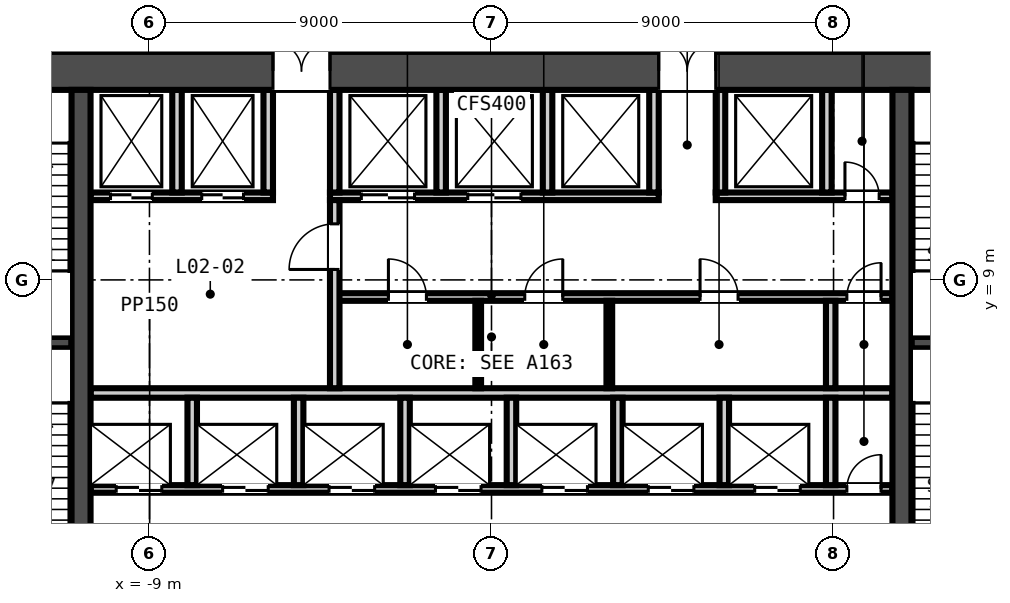
"""IFC4 building model, lengths in metres.
Left out: names, types, materials, properties, quantities, classifications, styles, units other than length and angle.
Written with IfcOpenShell. Run it as: python <this file> out.ifc"""

import sys

from ifc_helpers import new_model, si_unit, direction, frame, frame_2d, origin, place, context, subcontext, project, spatial, rectangle, extrude, element, fill, save


model = new_model("IFC4")
c1 = context("Model", 3, precision=1e-05, world=origin(), true_north=direction((0.0, 1.0)))
c2 = subcontext(c1, "Body", "Model", "MODEL_VIEW")
j1 = project(units=[si_unit("LENGTHUNIT", "METRE"), si_unit("PLANEANGLEUNIT", "RADIAN")], contexts=[c1])
p1 = place(None, origin())
s1 = spatial("IfcSite", under=j1, at=p1, CompositionType="ELEMENT")
p2 = place(p1, origin())
s2 = spatial("IfcBuilding", under=s1, at=p2, CompositionType="ELEMENT")
p3 = place(p2, frame((0.0, 0.0, 18.0)))
s3 = spatial("IfcBuildingStorey", under=s2, at=p3, CompositionType="ELEMENT", Elevation=18.0)
p4 = place(p3, frame((-15.0, 14.5, -0.4), z_axis=(0.0, 0.0, 1.0), x_axis=(1.0, 0.0, 0.0)))
e1 = element("IfcWall", 1, at=p4, inside=s3, PredefinedType="SOLIDWALL", context=c2, shape_type="SweptSolid", body=[
    extrude(rectangle(XDim=30.0, YDim=1.0, at=frame_2d((15.0, 0.0))), origin(), (0.0, 0.0, 1.0), 4.6),
])
p5 = place(p4, frame((9.25, 0.0, 0.4)))
e2 = element("IfcOpeningElement", 2, at=p5, cuts=e1, PredefinedType="OPENING", context=c2, shape_type="SweptSolid", body=[
    extrude(rectangle(XDim=1.5, YDim=2.1, at=frame_2d((0.75, 1.05))), frame((0.0, 0.51, 0.0), z_axis=(0.0, -1.0, 0.0), x_axis=(1.0, 0.0, 0.0)), (0.0, 0.0, 1.0), 1.02),
])
p6 = place(p4, frame((19.4, 0.0, 0.4)))
e3 = element("IfcOpeningElement", 3, at=p6, cuts=e1, PredefinedType="OPENING", context=c2, shape_type="SweptSolid", body=[
    extrude(rectangle(XDim=1.5, YDim=2.1, at=frame_2d((0.75, 1.05))), frame((0.0, 0.51, 0.0), z_axis=(0.0, -1.0, 0.0), x_axis=(1.0, 0.0, 0.0)), (0.0, 0.0, 1.0), 1.02),
])
p7 = place(p4, frame((1.5, 0.0, 0.4)))
e4 = element("IfcOpeningElement", 4, at=p7, cuts=e1, PredefinedType="OPENING", context=c2, shape_type="SweptSolid", body=[
    extrude(rectangle(XDim=1.2, YDim=2.1, at=frame_2d((0.6, 1.05))), frame((0.0, 0.51, 0.0), z_axis=(0.0, -1.0, 0.0), x_axis=(1.0, 0.0, 0.0)), (0.0, 0.0, 1.0), 1.02),
])
p8 = place(p4, frame((27.3, 0.0, 0.4)))
e5 = element("IfcOpeningElement", 5, at=p8, cuts=e1, PredefinedType="OPENING", context=c2, shape_type="SweptSolid", body=[
    extrude(rectangle(XDim=1.2, YDim=2.1, at=frame_2d((0.6, 1.05))), frame((0.0, 0.51, 0.0), z_axis=(0.0, -1.0, 0.0), x_axis=(1.0, 0.0, 0.0)), (0.0, 0.0, 1.0), 1.02),
])
for number, where, z_axis, x_axis in (
    (6, (-10.8, 1.0, -0.4), (0.0, 0.0, 1.0), (0.0, 1.0, 0.0)),
    (7, (10.8, 1.0, -0.4), (0.0, 0.0, 1.0), (0.0, 1.0, 0.0)),
):
    element("IfcWall", number, at=place(p3, frame(where, z_axis=z_axis, x_axis=x_axis)), inside=s3, PredefinedType="SOLIDWALL", context=c2, shape_type="SweptSolid", body=[
        extrude(rectangle(XDim=13.0, YDim=0.5, at=frame_2d((6.5, 0.0))), origin(), (0.0, 0.0, 1.0), 4.6),
    ])
p9 = place(p3, frame((-10.55, 3.5, 0.0), z_axis=(0.0, 0.0, 1.0), x_axis=(1.0, 0.0, 0.0)))
e8 = element("IfcWall", 8, at=p9, inside=s3, PredefinedType="PARTITIONING", context=c2, shape_type="SweptSolid", body=[
    extrude(rectangle(XDim=21.1, YDim=0.2, at=frame_2d((10.55, 0.0))), origin(), (0.0, 0.0, 1.0), 4.2),
])
p10 = place(p9, frame((0.675, 0.0, 0.0)))
e9 = element("IfcOpeningElement", 9, at=p10, cuts=e8, PredefinedType="OPENING", context=c2, shape_type="SweptSolid", body=[
    extrude(rectangle(XDim=1.2, YDim=2.1, at=frame_2d((0.6, 1.05))), frame((0.0, 0.11, 0.0), z_axis=(0.0, -1.0, 0.0), x_axis=(1.0, 0.0, 0.0)), (0.0, 0.0, 1.0), 0.22),
])
p11 = place(p9, frame((3.475, 0.0, 0.0)))
e10 = element("IfcOpeningElement", 10, at=p11, cuts=e8, PredefinedType="OPENING", context=c2, shape_type="SweptSolid", body=[
    extrude(rectangle(XDim=1.2, YDim=2.1, at=frame_2d((0.6, 1.05))), frame((0.0, 0.11, 0.0), z_axis=(0.0, -1.0, 0.0), x_axis=(1.0, 0.0, 0.0)), (0.0, 0.0, 1.0), 0.22),
])
p12 = place(p9, frame((6.275, 0.0, 0.0)))
e11 = element("IfcOpeningElement", 11, at=p12, cuts=e8, PredefinedType="OPENING", context=c2, shape_type="SweptSolid", body=[
    extrude(rectangle(XDim=1.2, YDim=2.1, at=frame_2d((0.6, 1.05))), frame((0.0, 0.11, 0.0), z_axis=(0.0, -1.0, 0.0), x_axis=(1.0, 0.0, 0.0)), (0.0, 0.0, 1.0), 0.22),
])
p13 = place(p9, frame((9.075, 0.0, 0.0)))
e12 = element("IfcOpeningElement", 12, at=p13, cuts=e8, PredefinedType="OPENING", context=c2, shape_type="SweptSolid", body=[
    extrude(rectangle(XDim=1.2, YDim=2.1, at=frame_2d((0.6, 1.05))), frame((0.0, 0.11, 0.0), z_axis=(0.0, -1.0, 0.0), x_axis=(1.0, 0.0, 0.0)), (0.0, 0.0, 1.0), 0.22),
])
p14 = place(p9, frame((11.875, 0.0, 0.0)))
e13 = element("IfcOpeningElement", 13, at=p14, cuts=e8, PredefinedType="OPENING", context=c2, shape_type="SweptSolid", body=[
    extrude(rectangle(XDim=1.2, YDim=2.1, at=frame_2d((0.6, 1.05))), frame((0.0, 0.11, 0.0), z_axis=(0.0, -1.0, 0.0), x_axis=(1.0, 0.0, 0.0)), (0.0, 0.0, 1.0), 0.22),
])
p15 = place(p9, frame((14.675, 0.0, 0.0)))
e14 = element("IfcOpeningElement", 14, at=p15, cuts=e8, PredefinedType="OPENING", context=c2, shape_type="SweptSolid", body=[
    extrude(rectangle(XDim=1.2, YDim=2.1, at=frame_2d((0.6, 1.05))), frame((0.0, 0.11, 0.0), z_axis=(0.0, -1.0, 0.0), x_axis=(1.0, 0.0, 0.0)), (0.0, 0.0, 1.0), 0.22),
])
p16 = place(p9, frame((17.475, 0.0, 0.0)))
e15 = element("IfcOpeningElement", 15, at=p16, cuts=e8, PredefinedType="OPENING", context=c2, shape_type="SweptSolid", body=[
    extrude(rectangle(XDim=1.2, YDim=2.1, at=frame_2d((0.6, 1.05))), frame((0.0, 0.11, 0.0), z_axis=(0.0, -1.0, 0.0), x_axis=(1.0, 0.0, 0.0)), (0.0, 0.0, 1.0), 0.22),
])
p17 = place(p9, frame((19.9, 0.0, 0.0)))
e16 = element("IfcOpeningElement", 16, at=p17, cuts=e8, PredefinedType="OPENING", context=c2, shape_type="SweptSolid", body=[
    extrude(rectangle(XDim=0.9, YDim=2.1, at=frame_2d((0.45, 1.05))), frame((0.0, 0.11, 0.0), z_axis=(0.0, -1.0, 0.0), x_axis=(1.0, 0.0, 0.0)), (0.0, 0.0, 1.0), 0.22),
])
p18 = place(p3, frame((-10.55, 6.025, 0.0), z_axis=(0.0, 0.0, 1.0), x_axis=(1.0, 0.0, 0.0)))
e17 = element("IfcWall", 17, at=p18, inside=s3, PredefinedType="PARTITIONING", context=c2, shape_type="SweptSolid", body=[
    extrude(rectangle(XDim=21.1, YDim=0.25, at=frame_2d((10.55, 0.0))), origin(), (0.0, 0.0, 1.0), 4.2),
])
p19 = place(p3, frame((-4.125, 8.55, 0.0), z_axis=(0.0, 0.0, 1.0), x_axis=(1.0, 0.0, 0.0)))
e18 = element("IfcWall", 18, at=p19, inside=s3, PredefinedType="PARTITIONING", context=c2, shape_type="SweptSolid", body=[
    extrude(rectangle(XDim=14.675, YDim=0.2, at=frame_2d((7.337, 0.0))), origin(), (0.0, 0.0, 1.0), 4.2),
])
p20 = place(p19, frame((1.413, 0.0, 0.0)))
e19 = element("IfcOpeningElement", 19, at=p20, cuts=e18, PredefinedType="OPENING", context=c2, shape_type="SweptSolid", body=[
    extrude(rectangle(XDim=1.0, YDim=2.1, at=frame_2d((0.5, 1.05))), frame((0.0, 0.11, 0.0), z_axis=(0.0, -1.0, 0.0), x_axis=(1.0, 0.0, 0.0)), (0.0, 0.0, 1.0), 0.22),
])
p21 = place(p19, frame((5.0, 0.0, 0.0)))
e20 = element("IfcOpeningElement", 20, at=p21, cuts=e18, PredefinedType="OPENING", context=c2, shape_type="SweptSolid", body=[
    extrude(rectangle(XDim=1.0, YDim=2.1, at=frame_2d((0.5, 1.05))), frame((0.0, 0.11, 0.0), z_axis=(0.0, -1.0, 0.0), x_axis=(1.0, 0.0, 0.0)), (0.0, 0.0, 1.0), 0.22),
])
p22 = place(p19, frame((9.613, 0.0, 0.0)))
e21 = element("IfcOpeningElement", 21, at=p22, cuts=e18, PredefinedType="OPENING", context=c2, shape_type="SweptSolid", body=[
    extrude(rectangle(XDim=1.0, YDim=2.1, at=frame_2d((0.5, 1.05))), frame((0.0, 0.11, 0.0), z_axis=(0.0, -1.0, 0.0), x_axis=(1.0, 0.0, 0.0)), (0.0, 0.0, 1.0), 0.22),
])
p23 = place(p19, frame((13.475, 0.0, 0.0)))
e22 = element("IfcOpeningElement", 22, at=p23, cuts=e18, PredefinedType="OPENING", context=c2, shape_type="SweptSolid", body=[
    extrude(rectangle(XDim=0.9, YDim=2.1, at=frame_2d((0.45, 1.05))), frame((0.0, 0.11, 0.0), z_axis=(0.0, -1.0, 0.0), x_axis=(1.0, 0.0, 0.0)), (0.0, 0.0, 1.0), 0.22),
])
p24 = place(p3, frame((-10.55, 11.2, 0.0), z_axis=(0.0, 0.0, 1.0), x_axis=(1.0, 0.0, 0.0)))
e23 = element("IfcWall", 23, at=p24, inside=s3, PredefinedType="PARTITIONING", context=c2, shape_type="SweptSolid", body=[
    extrude(rectangle(XDim=4.8, YDim=0.2, at=frame_2d((2.4, 0.0))), origin(), (0.0, 0.0, 1.0), 4.2),
])
p25 = place(p24, frame((0.525, 0.0, 0.0)))
e24 = element("IfcOpeningElement", 24, at=p25, cuts=e23, PredefinedType="OPENING", context=c2, shape_type="SweptSolid", body=[
    extrude(rectangle(XDim=1.1, YDim=2.1, at=frame_2d((0.55, 1.05))), frame((0.0, 0.11, 0.0), z_axis=(0.0, -1.0, 0.0), x_axis=(1.0, 0.0, 0.0)), (0.0, 0.0, 1.0), 0.22),
])
p26 = place(p24, frame((2.925, 0.0, 0.0)))
e25 = element("IfcOpeningElement", 25, at=p26, cuts=e23, PredefinedType="OPENING", context=c2, shape_type="SweptSolid", body=[
    extrude(rectangle(XDim=1.1, YDim=2.1, at=frame_2d((0.55, 1.05))), frame((0.0, 0.11, 0.0), z_axis=(0.0, -1.0, 0.0), x_axis=(1.0, 0.0, 0.0)), (0.0, 0.0, 1.0), 0.22),
])
p27 = place(p3, frame((-4.25, 11.2, 0.0), z_axis=(0.0, 0.0, 1.0), x_axis=(1.0, 0.0, 0.0)))
e26 = element("IfcWall", 26, at=p27, inside=s3, PredefinedType="PARTITIONING", context=c2, shape_type="SweptSolid", body=[
    extrude(rectangle(XDim=8.65, YDim=0.2, at=frame_2d((4.325, 0.0))), origin(), (0.0, 0.0, 1.0), 4.2),
])
p28 = place(p27, frame((0.825, 0.0, 0.0)))
e27 = element("IfcOpeningElement", 27, at=p28, cuts=e26, PredefinedType="OPENING", context=c2, shape_type="SweptSolid", body=[
    extrude(rectangle(XDim=1.4, YDim=2.1, at=frame_2d((0.7, 1.05))), frame((0.0, 0.11, 0.0), z_axis=(0.0, -1.0, 0.0), x_axis=(1.0, 0.0, 0.0)), (0.0, 0.0, 1.0), 0.22),
])
p29 = place(p27, frame((3.625, 0.0, 0.0)))
e28 = element("IfcOpeningElement", 28, at=p29, cuts=e26, PredefinedType="OPENING", context=c2, shape_type="SweptSolid", body=[
    extrude(rectangle(XDim=1.4, YDim=2.1, at=frame_2d((0.7, 1.05))), frame((0.0, 0.11, 0.0), z_axis=(0.0, -1.0, 0.0), x_axis=(1.0, 0.0, 0.0)), (0.0, 0.0, 1.0), 0.22),
])
p30 = place(p3, frame((5.9, 11.2, 0.0), z_axis=(0.0, 0.0, 1.0), x_axis=(1.0, 0.0, 0.0)))
e29 = element("IfcWall", 29, at=p30, inside=s3, PredefinedType="PARTITIONING", context=c2, shape_type="SweptSolid", body=[
    extrude(rectangle(XDim=4.65, YDim=0.2, at=frame_2d((2.325, 0.0))), origin(), (0.0, 0.0, 1.0), 4.2),
])
p31 = place(p30, frame((3.4, 0.0, 0.0)))
e30 = element("IfcOpeningElement", 30, at=p31, cuts=e29, PredefinedType="OPENING", context=c2, shape_type="SweptSolid", body=[
    extrude(rectangle(XDim=0.9, YDim=2.1, at=frame_2d((0.45, 1.05))), frame((0.0, 0.11, 0.0), z_axis=(0.0, -1.0, 0.0), x_axis=(1.0, 0.0, 0.0)), (0.0, 0.0, 1.0), 0.22),
])
p32 = place(p3, frame((-4.125, 6.15, 0.0), z_axis=(0.0, 0.0, 1.0), x_axis=(0.0, 1.0, 0.0)))
e31 = element("IfcWall", 31, at=p32, inside=s3, PredefinedType="PARTITIONING", context=c2, shape_type="SweptSolid", body=[
    extrude(rectangle(XDim=4.95, YDim=0.25, at=frame_2d((2.475, 0.0))), origin(), (0.0, 0.0, 1.0), 4.2),
])
p33 = place(p32, frame((3.125, 0.0, 0.0)))
e32 = element("IfcOpeningElement", 32, at=p33, cuts=e31, PredefinedType="OPENING", context=c2, shape_type="SweptSolid", body=[
    extrude(rectangle(XDim=1.2, YDim=2.1, at=frame_2d((0.6, 1.05))), frame((0.0, 0.135, 0.0), z_axis=(0.0, -1.0, 0.0), x_axis=(1.0, 0.0, 0.0)), (0.0, 0.0, 1.0), 0.27),
])
for number, where, z_axis, x_axis in (
    (33, (-7.875, 3.6, 0.0), (0.0, 0.0, 1.0), (0.0, 1.0, 0.0)),
    (34, (-5.075, 3.6, 0.0), (0.0, 0.0, 1.0), (0.0, 1.0, 0.0)),
    (35, (-2.275, 3.6, 0.0), (0.0, 0.0, 1.0), (0.0, 1.0, 0.0)),
    (36, (0.525, 3.6, 0.0), (0.0, 0.0, 1.0), (0.0, 1.0, 0.0)),
    (37, (3.325, 3.6, 0.0), (0.0, 0.0, 1.0), (0.0, 1.0, 0.0)),
    (38, (6.125, 3.6, 0.0), (0.0, 0.0, 1.0), (0.0, 1.0, 0.0)),
    (39, (8.925, 3.6, 0.0), (0.0, 0.0, 1.0), (0.0, 1.0, 0.0)),
):
    element("IfcWall", number, at=place(p3, frame(where, z_axis=z_axis, x_axis=x_axis)), inside=s3, PredefinedType="PARTITIONING", context=c2, shape_type="SweptSolid", body=[
        extrude(rectangle(XDim=2.3, YDim=0.25, at=frame_2d((1.15, 0.0))), origin(), (0.0, 0.0, 1.0), 4.2),
    ])
for number, where, z_axis, x_axis in (
    (40, (-0.35, 6.15, 0.0), (0.0, 0.0, 1.0), (0.0, 1.0, 0.0)),
    (41, (3.1, 6.15, 0.0), (0.0, 0.0, 1.0), (0.0, 1.0, 0.0)),
):
    element("IfcWall", number, at=place(p3, frame(where, z_axis=z_axis, x_axis=x_axis)), inside=s3, PredefinedType="PARTITIONING", context=c2, shape_type="SweptSolid", body=[
        extrude(rectangle(XDim=2.3, YDim=0.15, at=frame_2d((1.15, 0.0))), origin(), (0.0, 0.0, 1.0), 4.2),
    ])
p34 = place(p3, frame((8.925, 6.15, 0.0), z_axis=(0.0, 0.0, 1.0), x_axis=(0.0, 1.0, 0.0)))
e42 = element("IfcWall", 42, at=p34, inside=s3, PredefinedType="PARTITIONING", context=c2, shape_type="SweptSolid", body=[
    extrude(rectangle(XDim=2.3, YDim=0.25, at=frame_2d((1.15, 0.0))), origin(), (0.0, 0.0, 1.0), 4.2),
])
for number, where, z_axis, x_axis in (
    (43, (-8.275, 11.3, 0.0), (0.0, 0.0, 1.0), (0.0, 1.0, 0.0)),
    (44, (-5.875, 11.3, 0.0), (0.0, 0.0, 1.0), (0.0, 1.0, 0.0)),
    (45, (-4.125, 11.3, 0.0), (0.0, 0.0, 1.0), (0.0, 1.0, 0.0)),
    (46, (-1.325, 11.3, 0.0), (0.0, 0.0, 1.0), (0.0, 1.0, 0.0)),
    (47, (1.475, 11.3, 0.0), (0.0, 0.0, 1.0), (0.0, 1.0, 0.0)),
    (48, (4.275, 11.3, 0.0), (0.0, 0.0, 1.0), (0.0, 1.0, 0.0)),
    (49, (6.025, 11.3, 0.0), (0.0, 0.0, 1.0), (0.0, 1.0, 0.0)),
    (50, (8.825, 11.3, 0.0), (0.0, 0.0, 1.0), (0.0, 1.0, 0.0)),
):
    element("IfcWall", number, at=place(p3, frame(where, z_axis=z_axis, x_axis=x_axis)), inside=s3, PredefinedType="PARTITIONING", context=c2, shape_type="SweptSolid", body=[
        extrude(rectangle(XDim=2.7, YDim=0.25, at=frame_2d((1.35, 0.0))), origin(), (0.0, 0.0, 1.0), 4.2),
    ])
for number, where, z_axis, x_axis in (
    (51, (-14.0, 7.35, -0.4), (0.0, 0.0, 1.0), (1.0, 0.0, 0.0)),
    (52, (11.05, 7.35, -0.4), (0.0, 0.0, 1.0), (1.0, 0.0, 0.0)),
):
    element("IfcWall", number, at=place(p3, frame(where, z_axis=z_axis, x_axis=x_axis)), inside=s3, PredefinedType="SOLIDWALL", context=c2, shape_type="SweptSolid", body=[
        extrude(rectangle(XDim=2.95, YDim=0.3, at=frame_2d((1.475, 0.0))), origin(), (0.0, 0.0, 1.0), 4.6),
    ])
p35 = place(p33, origin())
e53 = element("IfcDoor", 53, at=p35, inside=s3, OperationType="SINGLE_SWING_LEFT", PredefinedType="DOOR", context=c2, shape_type="SweptSolid", body=[
    extrude(rectangle(XDim=1.2, YDim=2.1, at=frame_2d((0.6, 1.05))), frame((0.0, 0.025, 0.0), z_axis=(0.0, -1.0, 0.0), x_axis=(1.0, 0.0, 0.0)), (0.0, 0.0, 1.0), 0.05),
])
fill(e32, e53)
p36 = place(p10, origin())
e54 = element("IfcDoor", 54, at=p36, inside=s3, OperationType="DOUBLE_DOOR_SLIDING", PredefinedType="DOOR", context=c2, shape_type="SweptSolid", body=[
    extrude(rectangle(XDim=1.2, YDim=2.1, at=frame_2d((0.6, 1.05))), frame((0.0, 0.025, 0.0), z_axis=(0.0, -1.0, 0.0), x_axis=(1.0, 0.0, 0.0)), (0.0, 0.0, 1.0), 0.05),
])
fill(e9, e54)
p37 = place(p11, origin())
e55 = element("IfcDoor", 55, at=p37, inside=s3, OperationType="DOUBLE_DOOR_SLIDING", PredefinedType="DOOR", context=c2, shape_type="SweptSolid", body=[
    extrude(rectangle(XDim=1.2, YDim=2.1, at=frame_2d((0.6, 1.05))), frame((0.0, 0.025, 0.0), z_axis=(0.0, -1.0, 0.0), x_axis=(1.0, 0.0, 0.0)), (0.0, 0.0, 1.0), 0.05),
])
fill(e10, e55)
p38 = place(p12, origin())
e56 = element("IfcDoor", 56, at=p38, inside=s3, OperationType="DOUBLE_DOOR_SLIDING", PredefinedType="DOOR", context=c2, shape_type="SweptSolid", body=[
    extrude(rectangle(XDim=1.2, YDim=2.1, at=frame_2d((0.6, 1.05))), frame((0.0, 0.025, 0.0), z_axis=(0.0, -1.0, 0.0), x_axis=(1.0, 0.0, 0.0)), (0.0, 0.0, 1.0), 0.05),
])
fill(e11, e56)
p39 = place(p13, origin())
e57 = element("IfcDoor", 57, at=p39, inside=s3, OperationType="DOUBLE_DOOR_SLIDING", PredefinedType="DOOR", context=c2, shape_type="SweptSolid", body=[
    extrude(rectangle(XDim=1.2, YDim=2.1, at=frame_2d((0.6, 1.05))), frame((0.0, 0.025, 0.0), z_axis=(0.0, -1.0, 0.0), x_axis=(1.0, 0.0, 0.0)), (0.0, 0.0, 1.0), 0.05),
])
fill(e12, e57)
p40 = place(p14, origin())
e58 = element("IfcDoor", 58, at=p40, inside=s3, OperationType="DOUBLE_DOOR_SLIDING", PredefinedType="DOOR", context=c2, shape_type="SweptSolid", body=[
    extrude(rectangle(XDim=1.2, YDim=2.1, at=frame_2d((0.6, 1.05))), frame((0.0, 0.025, 0.0), z_axis=(0.0, -1.0, 0.0), x_axis=(1.0, 0.0, 0.0)), (0.0, 0.0, 1.0), 0.05),
])
fill(e13, e58)
p41 = place(p15, origin())
e59 = element("IfcDoor", 59, at=p41, inside=s3, OperationType="DOUBLE_DOOR_SLIDING", PredefinedType="DOOR", context=c2, shape_type="SweptSolid", body=[
    extrude(rectangle(XDim=1.2, YDim=2.1, at=frame_2d((0.6, 1.05))), frame((0.0, 0.025, 0.0), z_axis=(0.0, -1.0, 0.0), x_axis=(1.0, 0.0, 0.0)), (0.0, 0.0, 1.0), 0.05),
])
fill(e14, e59)
p42 = place(p16, origin())
e60 = element("IfcDoor", 60, at=p42, inside=s3, OperationType="DOUBLE_DOOR_SLIDING", PredefinedType="DOOR", context=c2, shape_type="SweptSolid", body=[
    extrude(rectangle(XDim=1.2, YDim=2.1, at=frame_2d((0.6, 1.05))), frame((0.0, 0.025, 0.0), z_axis=(0.0, -1.0, 0.0), x_axis=(1.0, 0.0, 0.0)), (0.0, 0.0, 1.0), 0.05),
])
fill(e15, e60)
p43 = place(p17, origin())
e61 = element("IfcDoor", 61, at=p43, inside=s3, OperationType="SINGLE_SWING_RIGHT", PredefinedType="DOOR", context=c2, shape_type="SweptSolid", body=[
    extrude(rectangle(XDim=0.9, YDim=2.1, at=frame_2d((0.45, 1.05))), frame((0.0, 0.025, 0.0), z_axis=(0.0, -1.0, 0.0), x_axis=(1.0, 0.0, 0.0)), (0.0, 0.0, 1.0), 0.05),
])
fill(e16, e61)
p44 = place(p20, origin())
e62 = element("IfcDoor", 62, at=p44, inside=s3, OperationType="SINGLE_SWING_LEFT", PredefinedType="DOOR", context=c2, shape_type="SweptSolid", body=[
    extrude(rectangle(XDim=1.0, YDim=2.1, at=frame_2d((0.5, 1.05))), frame((0.0, 0.025, 0.0), z_axis=(0.0, -1.0, 0.0), x_axis=(1.0, 0.0, 0.0)), (0.0, 0.0, 1.0), 0.05),
])
fill(e19, e62)
p45 = place(p21, origin())
e63 = element("IfcDoor", 63, at=p45, inside=s3, OperationType="SINGLE_SWING_RIGHT", PredefinedType="DOOR", context=c2, shape_type="SweptSolid", body=[
    extrude(rectangle(XDim=1.0, YDim=2.1, at=frame_2d((0.5, 1.05))), frame((0.0, 0.025, 0.0), z_axis=(0.0, -1.0, 0.0), x_axis=(1.0, 0.0, 0.0)), (0.0, 0.0, 1.0), 0.05),
])
fill(e20, e63)
p46 = place(p22, origin())
e64 = element("IfcDoor", 64, at=p46, inside=s3, OperationType="SINGLE_SWING_LEFT", PredefinedType="DOOR", context=c2, shape_type="SweptSolid", body=[
    extrude(rectangle(XDim=1.0, YDim=2.1, at=frame_2d((0.5, 1.05))), frame((0.0, 0.025, 0.0), z_axis=(0.0, -1.0, 0.0), x_axis=(1.0, 0.0, 0.0)), (0.0, 0.0, 1.0), 0.05),
])
fill(e21, e64)
p47 = place(p23, origin())
e65 = element("IfcDoor", 65, at=p47, inside=s3, OperationType="SINGLE_SWING_RIGHT", PredefinedType="DOOR", context=c2, shape_type="SweptSolid", body=[
    extrude(rectangle(XDim=0.9, YDim=2.1, at=frame_2d((0.45, 1.05))), frame((0.0, 0.025, 0.0), z_axis=(0.0, -1.0, 0.0), x_axis=(1.0, 0.0, 0.0)), (0.0, 0.0, 1.0), 0.05),
])
fill(e22, e65)
p48 = place(p25, origin())
e66 = element("IfcDoor", 66, at=p48, inside=s3, OperationType="DOUBLE_DOOR_SLIDING", PredefinedType="DOOR", context=c2, shape_type="SweptSolid", body=[
    extrude(rectangle(XDim=1.1, YDim=2.1, at=frame_2d((0.55, 1.05))), frame((0.0, 0.025, 0.0), z_axis=(0.0, -1.0, 0.0), x_axis=(1.0, 0.0, 0.0)), (0.0, 0.0, 1.0), 0.05),
])
fill(e24, e66)
p49 = place(p26, origin())
e67 = element("IfcDoor", 67, at=p49, inside=s3, OperationType="DOUBLE_DOOR_SLIDING", PredefinedType="DOOR", context=c2, shape_type="SweptSolid", body=[
    extrude(rectangle(XDim=1.1, YDim=2.1, at=frame_2d((0.55, 1.05))), frame((0.0, 0.025, 0.0), z_axis=(0.0, -1.0, 0.0), x_axis=(1.0, 0.0, 0.0)), (0.0, 0.0, 1.0), 0.05),
])
fill(e25, e67)
p50 = place(p28, origin())
e68 = element("IfcDoor", 68, at=p50, inside=s3, OperationType="DOUBLE_DOOR_SLIDING", PredefinedType="DOOR", context=c2, shape_type="SweptSolid", body=[
    extrude(rectangle(XDim=1.4, YDim=2.1, at=frame_2d((0.7, 1.05))), frame((0.0, 0.025, 0.0), z_axis=(0.0, -1.0, 0.0), x_axis=(1.0, 0.0, 0.0)), (0.0, 0.0, 1.0), 0.05),
])
fill(e27, e68)
p51 = place(p29, origin())
e69 = element("IfcDoor", 69, at=p51, inside=s3, OperationType="DOUBLE_DOOR_SLIDING", PredefinedType="DOOR", context=c2, shape_type="SweptSolid", body=[
    extrude(rectangle(XDim=1.4, YDim=2.1, at=frame_2d((0.7, 1.05))), frame((0.0, 0.025, 0.0), z_axis=(0.0, -1.0, 0.0), x_axis=(1.0, 0.0, 0.0)), (0.0, 0.0, 1.0), 0.05),
])
fill(e28, e69)
p52 = place(p31, origin())
e70 = element("IfcDoor", 70, at=p52, inside=s3, OperationType="SINGLE_SWING_LEFT", PredefinedType="DOOR", context=c2, shape_type="SweptSolid", body=[
    extrude(rectangle(XDim=0.9, YDim=2.1, at=frame_2d((0.45, 1.05))), frame((0.0, 0.025, 0.0), z_axis=(0.0, -1.0, 0.0), x_axis=(1.0, 0.0, 0.0)), (0.0, 0.0, 1.0), 0.05),
])
fill(e30, e70)
p53 = place(p5, origin())
e71 = element("IfcDoor", 71, at=p53, inside=s3, OperationType="DOUBLE_DOOR_SINGLE_SWING", PredefinedType="DOOR", context=c2, shape_type="SweptSolid", body=[
    extrude(rectangle(XDim=1.5, YDim=2.1, at=frame_2d((0.75, 1.05))), frame((0.0, 0.025, 0.0), z_axis=(0.0, -1.0, 0.0), x_axis=(1.0, 0.0, 0.0)), (0.0, 0.0, 1.0), 0.05),
])
fill(e2, e71)
p54 = place(p6, origin())
e72 = element("IfcDoor", 72, at=p54, inside=s3, OperationType="DOUBLE_DOOR_SINGLE_SWING", PredefinedType="DOOR", context=c2, shape_type="SweptSolid", body=[
    extrude(rectangle(XDim=1.5, YDim=2.1, at=frame_2d((0.75, 1.05))), frame((0.0, 0.025, 0.0), z_axis=(0.0, -1.0, 0.0), x_axis=(1.0, 0.0, 0.0)), (0.0, 0.0, 1.0), 0.05),
])
fill(e3, e72)
save(model, sys.argv[1])
